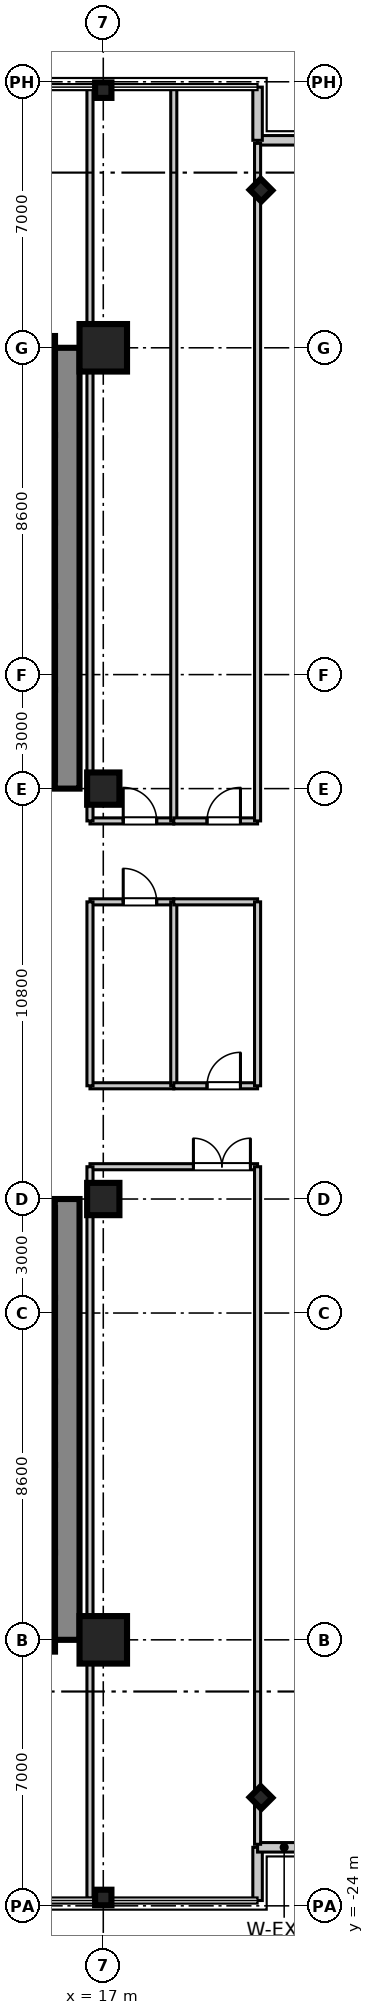
"""IFC4 building model, lengths in metres.
Left out: names, types, materials, properties, quantities, classifications, styles, units other than length and angle.
Written with IfcOpenShell. Run it as: python <this file> out.ifc"""

import sys

from ifc_helpers import new_model, si_unit, direction, frame, frame_2d, origin, origin_2d, place, context, subcontext, project, spatial, rectangle, i_section, extrude, source, transform, mapped, element, fill, save


model = new_model("IFC4")
c1 = context("Model", 3, precision=1e-05, world=origin(), true_north=direction((0.0, 1.0)))
c2 = subcontext(c1, "Body", "Model", "MODEL_VIEW")
j1 = project(units=[si_unit("LENGTHUNIT", "METRE"), si_unit("PLANEANGLEUNIT", "RADIAN")], contexts=[c1])
p1 = place(None, origin())
s1 = spatial("IfcSite", under=j1, at=p1, CompositionType="ELEMENT")
p2 = place(p1, origin())
s2 = spatial("IfcBuilding", under=s1, at=p2, CompositionType="ELEMENT")
p3 = place(p2, frame((0.0, 0.0, 91.95)))
s3 = spatial("IfcBuildingStorey", under=s2, at=p3, CompositionType="ELEMENT", Elevation=91.95)
m1 = source(origin(), c2, "Body", "SweptSolid", [
    extrude(rectangle(XDim=1.25, YDim=1.25, at=origin_2d()), origin(), (0.0, 0.0, 1.0), 3.605),
])
p4 = place(p3, frame((17.0, -17.0, 0.0), z_axis=(0.0, 0.0, 1.0), x_axis=(1.0, 0.0, 0.0)))
e1 = element("IfcColumn", 1, at=p4, inside=s3, PredefinedType="COLUMN", context=c2, shape_type="MappedRepresentation", body=[
    mapped(m1, transform((0.0, 0.0, 0.0), scale=1.0)),
])
m2 = source(origin(), c2, "Body", "SweptSolid", [
    extrude(rectangle(XDim=0.85, YDim=0.85, at=origin_2d()), origin(), (0.0, 0.0, 1.0), 3.605),
])
for number, where, z_axis, x_axis in (
    (2, (17.0, -5.4, 0.0), (0.0, 0.0, 1.0), (1.0, 0.0, 0.0)),
    (3, (17.0, 5.4, 0.0), (0.0, 0.0, 1.0), (1.0, 0.0, 0.0)),
):
    element("IfcColumn", number, at=place(p3, frame(where, z_axis=z_axis, x_axis=x_axis)), inside=s3, PredefinedType="PILASTER", context=c2, shape_type="MappedRepresentation", body=[
        mapped(m2, transform((0.0, 0.0, 0.0), scale=1.0)),
    ])
p5 = place(p3, frame((17.0, 17.0, 0.0), z_axis=(0.0, 0.0, 1.0), x_axis=(1.0, 0.0, 0.0)))
e4 = element("IfcColumn", 4, at=p5, inside=s3, PredefinedType="COLUMN", context=c2, shape_type="MappedRepresentation", body=[
    mapped(m1, transform((0.0, 0.0, 0.0), scale=1.0)),
])
m3 = source(origin(), c2, "Body", "SweptSolid", [
    extrude(i_section(OverallWidth=0.409, OverallDepth=0.43, WebThickness=0.021, FlangeThickness=0.034, at=origin_2d()), origin(), (0.0, 0.0, 1.0), 3.605),
])
for number, where, z_axis, x_axis in (
    (5, (17.0, -23.78, 0.0), (0.0, 0.0, 1.0), (0.0, 1.0, 0.0)),
    (6, (17.0, 23.78, 0.0), (0.0, 0.0, 1.0), (0.0, 1.0, 0.0)),
    (7, (21.15, -21.15, 0.0), (0.0, 0.0, 1.0), (0.707, 0.707, 0.0)),
    (8, (21.15, 21.15, 0.0), (0.0, 0.0, 1.0), (0.707, 0.707, 0.0)),
):
    element("IfcColumn", number, at=place(p3, frame(where, z_axis=z_axis, x_axis=x_axis)), inside=s3, PredefinedType="COLUMN", context=c2, shape_type="MappedRepresentation", body=[
        mapped(m3, transform((0.0, 0.0, 0.0), scale=1.0)),
    ])
m4 = source(origin(), c2, "Body", "SweptSolid", [
    extrude(rectangle(XDim=11.6, YDim=0.65, at=frame_2d((5.8, 0.0))), origin(), (0.0, 0.0, 1.0), 3.38),
])
for number, where, z_axis, x_axis in (
    (9, (16.05, 5.4, 0.0), (0.0, 0.0, 1.0), (0.0, 1.0, 0.0)),
    (10, (16.05, -17.0, 0.0), (0.0, 0.0, 1.0), (0.0, 1.0, 0.0)),
):
    element("IfcWall", number, at=place(p3, frame(where, z_axis=z_axis, x_axis=x_axis)), inside=s3, PredefinedType="SHEAR", context=c2, shape_type="MappedRepresentation", body=[
        mapped(m4, transform((0.0, 0.0, 0.0), scale=1.0)),
    ])
m5 = source(origin(), c2, "Body", "SweptSolid", [
    extrude(rectangle(XDim=2.36, YDim=0.22, at=frame_2d((1.18, 0.0))), origin(), (0.0, 0.0, 1.0), 3.38),
])
p6 = place(p3, frame((15.62, 5.64, 0.0), z_axis=(0.0, 0.0, 1.0), x_axis=(0.0, 1.0, 0.0)))
e11 = element("IfcWall", 11, at=p6, inside=s3, PredefinedType="SHEAR", context=c2, shape_type="MappedRepresentation", body=[
    mapped(m5, transform((0.0, 0.0, 0.0), scale=1.0)),
])
m6 = source(origin(), c2, "Body", "SweptSolid", [
    extrude(rectangle(XDim=2.2, YDim=0.22, at=frame_2d((1.1, 0.0))), origin(), (0.0, 0.0, 1.0), 3.38),
])
for number, where, z_axis, x_axis in (
    (12, (15.62, 8.0, 0.0), (0.0, 0.0, 1.0), (0.0, 1.0, 0.0)),
    (13, (15.62, 10.2, 0.0), (0.0, 0.0, 1.0), (0.0, 1.0, 0.0)),
):
    element("IfcWall", number, at=place(p3, frame(where, z_axis=z_axis, x_axis=x_axis)), inside=s3, PredefinedType="SHEAR", context=c2, shape_type="MappedRepresentation", body=[
        mapped(m6, transform((0.0, 0.0, 0.0), scale=1.0)),
    ])
m7 = source(origin(), c2, "Body", "SweptSolid", [
    extrude(rectangle(XDim=2.3, YDim=0.22, at=frame_2d((1.15, 0.0))), origin(), (0.0, 0.0, 1.0), 3.38),
])
p7 = place(p3, frame((15.62, 12.4, 0.0), z_axis=(0.0, 0.0, 1.0), x_axis=(0.0, 1.0, 0.0)))
e14 = element("IfcWall", 14, at=p7, inside=s3, PredefinedType="SHEAR", context=c2, shape_type="MappedRepresentation", body=[
    mapped(m7, transform((0.0, 0.0, 0.0), scale=1.0)),
])
p8 = place(p3, frame((15.62, -8.0, 0.0), z_axis=(0.0, 0.0, 1.0), x_axis=(0.0, 1.0, 0.0)))
e15 = element("IfcWall", 15, at=p8, inside=s3, PredefinedType="SHEAR", context=c2, shape_type="MappedRepresentation", body=[
    mapped(m5, transform((0.0, 0.0, 0.0), scale=1.0)),
])
for number, where, z_axis, x_axis in (
    (16, (15.62, -10.2, 0.0), (0.0, 0.0, 1.0), (0.0, 1.0, 0.0)),
    (17, (15.62, -12.4, 0.0), (0.0, 0.0, 1.0), (0.0, 1.0, 0.0)),
):
    element("IfcWall", number, at=place(p3, frame(where, z_axis=z_axis, x_axis=x_axis)), inside=s3, PredefinedType="SHEAR", context=c2, shape_type="MappedRepresentation", body=[
        mapped(m6, transform((0.0, 0.0, 0.0), scale=1.0)),
    ])
p9 = place(p3, frame((15.62, -14.7, 0.0), z_axis=(0.0, 0.0, 1.0), x_axis=(0.0, 1.0, 0.0)))
e18 = element("IfcWall", 18, at=p9, inside=s3, PredefinedType="SHEAR", context=c2, shape_type="MappedRepresentation", body=[
    mapped(m7, transform((0.0, 0.0, 0.0), scale=1.0)),
])
m8 = source(origin(), c2, "Body", "SweptSolid", [
    extrude(rectangle(XDim=2.61, YDim=0.22, at=frame_2d((1.305, 0.0))), origin(), (0.0, 0.0, 1.0), 3.38),
])
for number, where, z_axis, x_axis in (
    (19, (15.62, 14.7, 0.0), (0.0, 0.0, 1.0), (0.0, 1.0, 0.0)),
    (20, (15.62, -17.31, 0.0), (0.0, 0.0, 1.0), (0.0, 1.0, 0.0)),
):
    element("IfcWall", number, at=place(p3, frame(where, z_axis=z_axis, x_axis=x_axis)), inside=s3, PredefinedType="SHEAR", context=c2, shape_type="MappedRepresentation", body=[
        mapped(m8, transform((0.0, 0.0, 0.0), scale=1.0)),
    ])
m9 = source(origin(), c2, "Body", "SweptSolid", [
    extrude(rectangle(XDim=1.4, YDim=0.25, at=frame_2d((0.7, 0.0))), origin(), (0.0, 0.0, 1.0), 3.38),
])
p10 = place(p3, frame((21.06, -23.86, 0.0), z_axis=(0.0, 0.0, 1.0), x_axis=(0.0, 1.0, 0.0)))
e21 = element("IfcWall", 21, at=p10, inside=s3, PredefinedType="STANDARD", context=c2, shape_type="MappedRepresentation", body=[
    mapped(m9, transform((0.0, 0.0, 0.0), scale=1.0)),
])
m10 = source(origin(), c2, "Body", "SweptSolid", [
    extrude(rectangle(XDim=1.4, YDim=0.25, at=frame_2d((0.7, 0.0))), origin(), (0.0, 0.0, 1.0), 3.38),
])
for number, where, z_axis, x_axis in (
    (22, (21.06, -22.46, 0.0), (0.0, 0.0, 1.0), (1.0, 0.0, 0.0)),
    (23, (21.06, 22.46, 0.0), (0.0, 0.0, 1.0), (1.0, 0.0, 0.0)),
):
    element("IfcWall", number, at=place(p3, frame(where, z_axis=z_axis, x_axis=x_axis)), inside=s3, PredefinedType="STANDARD", context=c2, shape_type="MappedRepresentation", body=[
        mapped(m10, transform((0.0, 0.0, 0.0), scale=1.0)),
    ])
p11 = place(p3, frame((21.06, 22.46, 0.0), z_axis=(0.0, 0.0, 1.0), x_axis=(0.0, 1.0, 0.0)))
e24 = element("IfcWall", 24, at=p11, inside=s3, PredefinedType="STANDARD", context=c2, shape_type="MappedRepresentation", body=[
    mapped(m9, transform((0.0, 0.0, 0.0), scale=1.0)),
])
m11 = source(origin(), c2, "Body", "SweptSolid", [
    extrude(rectangle(XDim=2.205, YDim=0.16, at=frame_2d((1.103, 0.0))), origin(), (0.0, 0.0, 1.0), 2.72),
])
p12 = place(p3, frame((16.65, 4.55, 0.0), z_axis=(0.0, 0.0, 1.0), x_axis=(1.0, 0.0, 0.0)))
e25 = element("IfcWall", 25, at=p12, inside=s3, PredefinedType="PARTITIONING", context=c2, shape_type="MappedRepresentation", body=[
    mapped(m11, transform((0.0, 0.0, 0.0), scale=1.0)),
])
p13 = place(p12, frame((0.875, 0.0, 0.0)))
e26 = element("IfcOpeningElement", 26, at=p13, cuts=e25, PredefinedType="OPENING", context=c2, shape_type="SweptSolid", body=[
    extrude(rectangle(XDim=0.88, YDim=2.1, at=frame_2d((0.44, 1.05))), frame((0.0, 0.09, 0.0), z_axis=(0.0, -1.0, 0.0), x_axis=(1.0, 0.0, 0.0)), (0.0, 0.0, 1.0), 0.18),
])
m12 = source(origin(), c2, "Body", "SweptSolid", [
    extrude(rectangle(XDim=19.25, YDim=0.16, at=frame_2d((9.625, 0.0))), origin(), (0.0, 0.0, 1.0), 2.72),
])
for number, where, z_axis, x_axis in (
    (27, (16.65, 4.55, 0.0), (0.0, 0.0, 1.0), (0.0, 1.0, 0.0)),
    (28, (18.855, 4.55, 0.0), (0.0, 0.0, 1.0), (0.0, 1.0, 0.0)),
):
    element("IfcWall", number, at=place(p3, frame(where, z_axis=z_axis, x_axis=x_axis)), inside=s3, PredefinedType="PARTITIONING", context=c2, shape_type="MappedRepresentation", body=[
        mapped(m12, transform((0.0, 0.0, 0.0), scale=1.0)),
    ])
p14 = place(p3, frame((18.855, 4.55, 0.0), z_axis=(0.0, 0.0, 1.0), x_axis=(1.0, 0.0, 0.0)))
e29 = element("IfcWall", 29, at=p14, inside=s3, PredefinedType="PARTITIONING", context=c2, shape_type="MappedRepresentation", body=[
    mapped(m11, transform((0.0, 0.0, 0.0), scale=1.0)),
])
p15 = place(p14, frame((0.875, 0.0, 0.0)))
e30 = element("IfcOpeningElement", 30, at=p15, cuts=e29, PredefinedType="OPENING", context=c2, shape_type="SweptSolid", body=[
    extrude(rectangle(XDim=0.88, YDim=2.1, at=frame_2d((0.44, 1.05))), frame((0.0, 0.09, 0.0), z_axis=(0.0, -1.0, 0.0), x_axis=(1.0, 0.0, 0.0)), (0.0, 0.0, 1.0), 0.18),
])
m13 = source(origin(), c2, "Body", "SweptSolid", [
    extrude(rectangle(XDim=17.83, YDim=0.16, at=frame_2d((8.915, 0.0))), origin(), (0.0, 0.0, 1.0), 2.72),
])
p16 = place(p3, frame((21.06, 4.55, 0.0), z_axis=(0.0, 0.0, 1.0), x_axis=(0.0, 1.0, 0.0)))
e31 = element("IfcWall", 31, at=p16, inside=s3, PredefinedType="PARTITIONING", context=c2, shape_type="MappedRepresentation", body=[
    mapped(m13, transform((0.0, 0.0, 0.0), scale=1.0)),
])
m14 = source(origin(), c2, "Body", "SweptSolid", [
    extrude(rectangle(XDim=4.41, YDim=0.16, at=frame_2d((2.205, 0.0))), origin(), (0.0, 0.0, 1.0), 2.72),
])
p17 = place(p3, frame((16.65, -4.55, 0.0), z_axis=(0.0, 0.0, 1.0), x_axis=(1.0, 0.0, 0.0)))
e32 = element("IfcWall", 32, at=p17, inside=s3, PredefinedType="PARTITIONING", context=c2, shape_type="MappedRepresentation", body=[
    mapped(m14, transform((0.0, 0.0, 0.0), scale=1.0)),
])
p18 = place(p17, frame((2.722, 0.0, 0.0)))
e33 = element("IfcOpeningElement", 33, at=p18, cuts=e32, PredefinedType="OPENING", context=c2, shape_type="SweptSolid", body=[
    extrude(rectangle(XDim=1.5, YDim=2.15, at=frame_2d((0.75, 1.075))), frame((0.0, 0.09, 0.0), z_axis=(0.0, -1.0, 0.0), x_axis=(1.0, 0.0, 0.0)), (0.0, 0.0, 1.0), 0.18),
])
p19 = place(p3, frame((16.65, -23.8, 0.0), z_axis=(0.0, 0.0, 1.0), x_axis=(0.0, 1.0, 0.0)))
e34 = element("IfcWall", 34, at=p19, inside=s3, PredefinedType="PARTITIONING", context=c2, shape_type="MappedRepresentation", body=[
    mapped(m12, transform((0.0, 0.0, 0.0), scale=1.0)),
])
p20 = place(p3, frame((21.06, -22.38, 0.0), z_axis=(0.0, 0.0, 1.0), x_axis=(0.0, 1.0, 0.0)))
e35 = element("IfcWall", 35, at=p20, inside=s3, PredefinedType="PARTITIONING", context=c2, shape_type="MappedRepresentation", body=[
    mapped(m13, transform((0.0, 0.0, 0.0), scale=1.0)),
])
p21 = place(p3, frame((16.65, -2.42, 0.0), z_axis=(0.0, 0.0, 1.0), x_axis=(1.0, 0.0, 0.0)))
e36 = element("IfcWall", 36, at=p21, inside=s3, PredefinedType="PARTITIONING", context=c2, shape_type="MappedRepresentation", body=[
    mapped(m11, transform((0.0, 0.0, 0.0), scale=1.0)),
])
p22 = place(p3, frame((16.65, 2.42, 0.0), z_axis=(0.0, 0.0, 1.0), x_axis=(1.0, 0.0, 0.0)))
e37 = element("IfcWall", 37, at=p22, inside=s3, PredefinedType="PARTITIONING", context=c2, shape_type="MappedRepresentation", body=[
    mapped(m11, transform((0.0, 0.0, 0.0), scale=1.0)),
])
p23 = place(p22, frame((0.875, 0.0, 0.0)))
e38 = element("IfcOpeningElement", 38, at=p23, cuts=e37, PredefinedType="OPENING", context=c2, shape_type="SweptSolid", body=[
    extrude(rectangle(XDim=0.88, YDim=2.1, at=frame_2d((0.44, 1.05))), frame((0.0, 0.09, 0.0), z_axis=(0.0, -1.0, 0.0), x_axis=(1.0, 0.0, 0.0)), (0.0, 0.0, 1.0), 0.18),
])
m15 = source(origin(), c2, "Body", "SweptSolid", [
    extrude(rectangle(XDim=4.84, YDim=0.16, at=frame_2d((2.42, 0.0))), origin(), (0.0, 0.0, 1.0), 2.72),
])
for number, where, z_axis, x_axis in (
    (39, (16.65, -2.42, 0.0), (0.0, 0.0, 1.0), (0.0, 1.0, 0.0)),
    (40, (18.855, -2.42, 0.0), (0.0, 0.0, 1.0), (0.0, 1.0, 0.0)),
):
    element("IfcWall", number, at=place(p3, frame(where, z_axis=z_axis, x_axis=x_axis)), inside=s3, PredefinedType="PARTITIONING", context=c2, shape_type="MappedRepresentation", body=[
        mapped(m15, transform((0.0, 0.0, 0.0), scale=1.0)),
    ])
p24 = place(p3, frame((18.855, -2.42, 0.0), z_axis=(0.0, 0.0, 1.0), x_axis=(1.0, 0.0, 0.0)))
e41 = element("IfcWall", 41, at=p24, inside=s3, PredefinedType="PARTITIONING", context=c2, shape_type="MappedRepresentation", body=[
    mapped(m11, transform((0.0, 0.0, 0.0), scale=1.0)),
])
p25 = place(p24, frame((0.875, 0.0, 0.0)))
e42 = element("IfcOpeningElement", 42, at=p25, cuts=e41, PredefinedType="OPENING", context=c2, shape_type="SweptSolid", body=[
    extrude(rectangle(XDim=0.88, YDim=2.1, at=frame_2d((0.44, 1.05))), frame((0.0, 0.09, 0.0), z_axis=(0.0, -1.0, 0.0), x_axis=(1.0, 0.0, 0.0)), (0.0, 0.0, 1.0), 0.18),
])
p26 = place(p3, frame((18.855, 2.42, 0.0), z_axis=(0.0, 0.0, 1.0), x_axis=(1.0, 0.0, 0.0)))
e43 = element("IfcWall", 43, at=p26, inside=s3, PredefinedType="PARTITIONING", context=c2, shape_type="MappedRepresentation", body=[
    mapped(m11, transform((0.0, 0.0, 0.0), scale=1.0)),
])
p27 = place(p3, frame((21.06, -2.42, 0.0), z_axis=(0.0, 0.0, 1.0), x_axis=(0.0, 1.0, 0.0)))
e44 = element("IfcWall", 44, at=p27, inside=s3, PredefinedType="PARTITIONING", context=c2, shape_type="MappedRepresentation", body=[
    mapped(m15, transform((0.0, 0.0, 0.0), scale=1.0)),
])
m16 = source(origin(), c2, "Body", "SweptSolid", [
    extrude(rectangle(XDim=0.88, YDim=2.1, at=frame_2d((0.44, 1.05))), frame((0.0, 0.025, 0.0), z_axis=(0.0, -1.0, 0.0), x_axis=(1.0, 0.0, 0.0)), (0.0, 0.0, 1.0), 0.05),
])
p28 = place(p13, origin())
e45 = element("IfcDoor", 45, at=p28, inside=s3, OperationType="SINGLE_SWING_LEFT", PredefinedType="DOOR", context=c2, shape_type="MappedRepresentation", body=[
    mapped(m16, transform((0.0, 0.0, 0.0), scale=1.0)),
])
fill(e26, e45)
p29 = place(p15, origin())
e46 = element("IfcDoor", 46, at=p29, inside=s3, OperationType="SINGLE_SWING_RIGHT", PredefinedType="DOOR", context=c2, shape_type="MappedRepresentation", body=[
    mapped(m16, transform((0.0, 0.0, 0.0), scale=1.0)),
])
fill(e30, e46)
m17 = source(origin(), c2, "Body", "SweptSolid", [
    extrude(rectangle(XDim=1.5, YDim=2.15, at=frame_2d((0.75, 1.075))), frame((0.0, 0.025, 0.0), z_axis=(0.0, -1.0, 0.0), x_axis=(1.0, 0.0, 0.0)), (0.0, 0.0, 1.0), 0.05),
])
p30 = place(p18, frame((1.5, 0.0, 0.0), z_axis=(0.0, 0.0, 1.0), x_axis=(-1.0, 0.0, 0.0)))
e47 = element("IfcDoor", 47, at=p30, inside=s3, OperationType="DOUBLE_DOOR_SINGLE_SWING", PredefinedType="DOOR", context=c2, shape_type="MappedRepresentation", body=[
    mapped(m17, transform((0.0, 0.0, 0.0), scale=1.0)),
])
fill(e33, e47)
p31 = place(p23, frame((0.88, 0.0, 0.0), z_axis=(0.0, 0.0, 1.0), x_axis=(-1.0, 0.0, 0.0)))
e48 = element("IfcDoor", 48, at=p31, inside=s3, OperationType="SINGLE_SWING_LEFT", PredefinedType="DOOR", context=c2, shape_type="MappedRepresentation", body=[
    mapped(m16, transform((0.0, 0.0, 0.0), scale=1.0)),
])
fill(e38, e48)
p32 = place(p25, origin())
e49 = element("IfcDoor", 49, at=p32, inside=s3, OperationType="SINGLE_SWING_RIGHT", PredefinedType="DOOR", context=c2, shape_type="MappedRepresentation", body=[
    mapped(m16, transform((0.0, 0.0, 0.0), scale=1.0)),
])
fill(e42, e49)
save(model, sys.argv[1])
